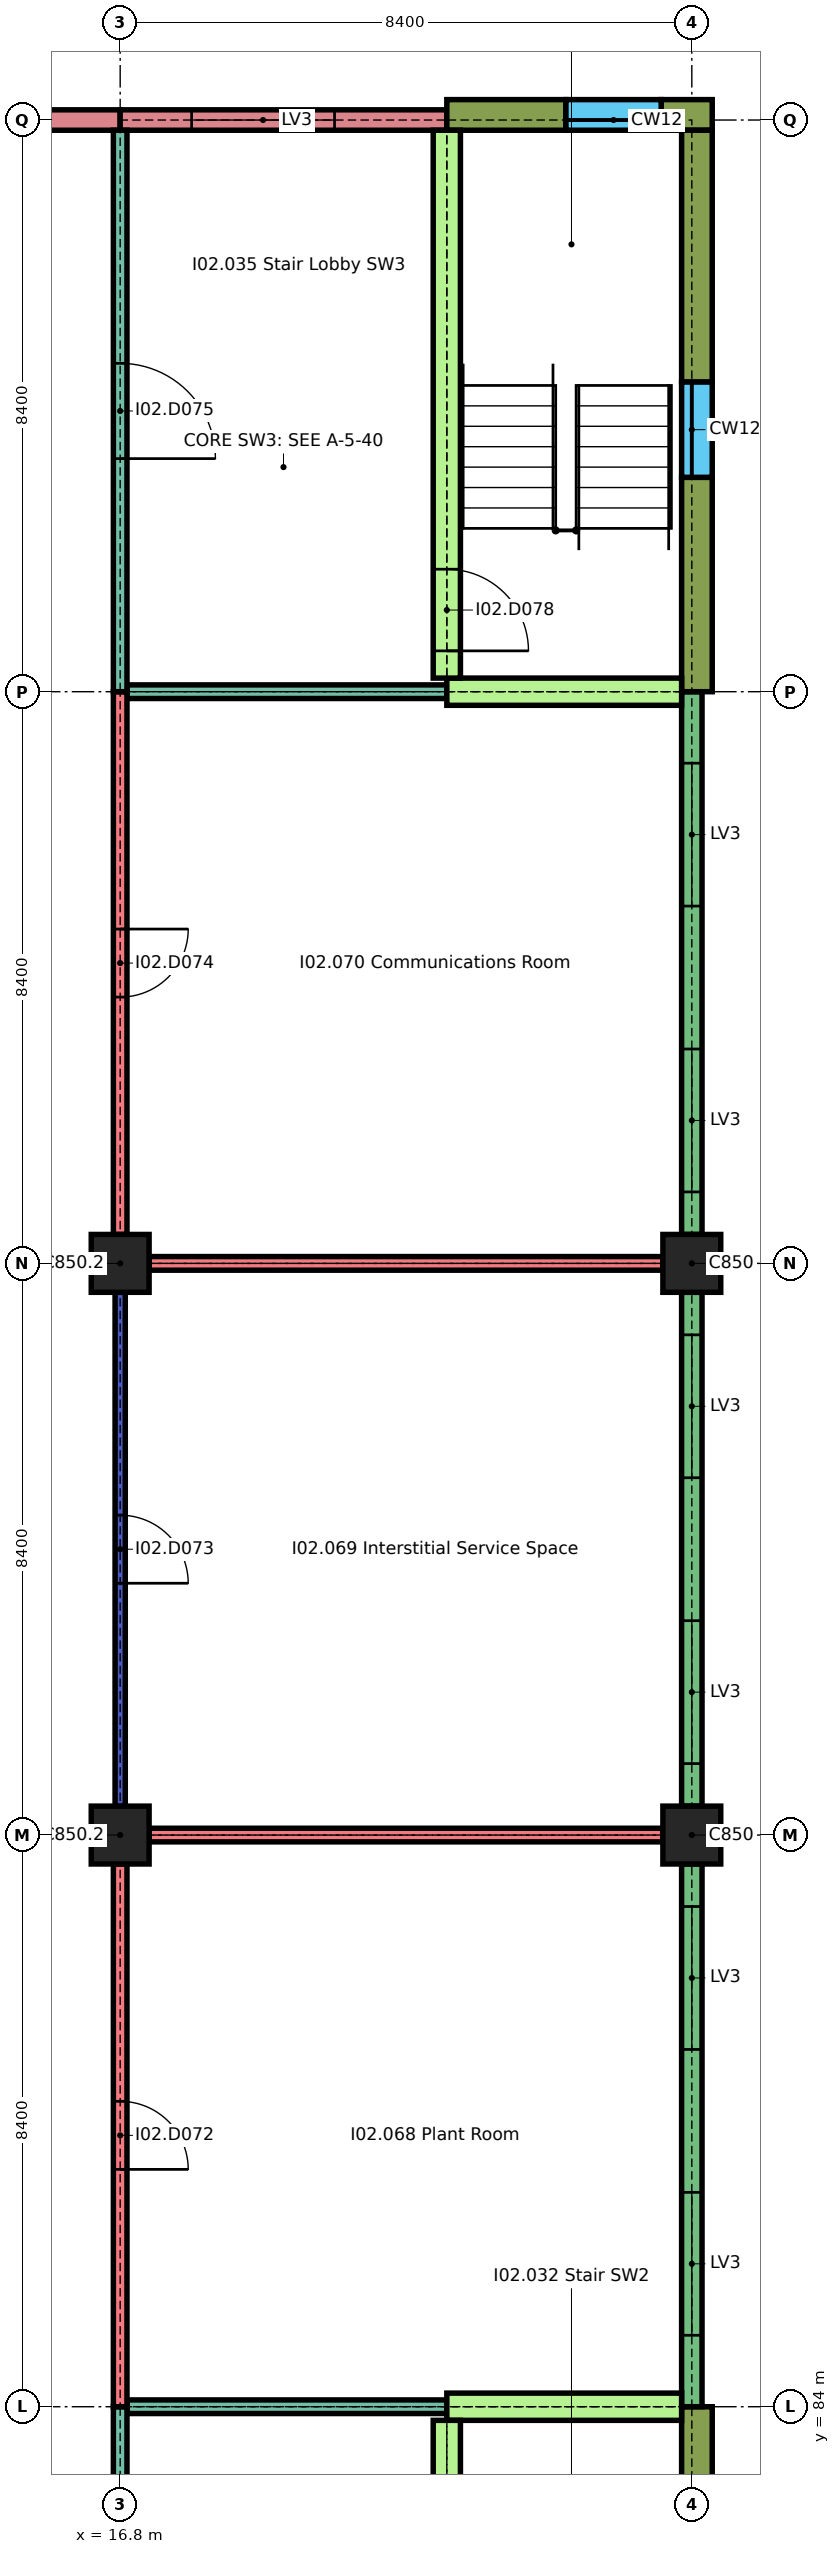
"""IFC4 building model, lengths in metres.
Left out: names, types, materials, properties, quantities, classifications, styles, units other than length and angle.
Written with IfcOpenShell. Run it as: python <this file> out.ifc"""

import sys

from ifc_helpers import new_model, si_unit, direction, frame, frame_2d, origin, origin_2d, place, context, subcontext, project, spatial, rectangle, extrude, element, fill, save


model = new_model("IFC4")
c1 = context("Model", 3, precision=1e-05, world=origin(), true_north=direction((0.0, 1.0)))
c2 = subcontext(c1, "Body", "Model", "MODEL_VIEW")
j1 = project(units=[si_unit("LENGTHUNIT", "METRE"), si_unit("PLANEANGLEUNIT", "RADIAN")], contexts=[c1])
p1 = place(None, origin())
s1 = spatial("IfcSite", under=j1, at=p1, CompositionType="ELEMENT")
p2 = place(p1, origin())
s2 = spatial("IfcBuilding", under=s1, at=p2, CompositionType="ELEMENT")
p3 = place(p2, frame((0.0, 0.0, 12.9)))
s3 = spatial("IfcBuildingStorey", under=s2, at=p3, CompositionType="ELEMENT", Elevation=12.9)
for number, where, z_axis, x_axis in (
    (1, (16.8, 92.4, 0.0), (0.0, 0.0, 1.0), (1.0, 0.0, 0.0)),
    (2, (25.2, 92.4, 0.0), (0.0, 0.0, 1.0), (1.0, 0.0, 0.0)),
    (3, (16.8, 100.8, 0.0), (0.0, 0.0, 1.0), (1.0, 0.0, 0.0)),
    (4, (25.2, 100.8, 0.0), (0.0, 0.0, 1.0), (1.0, 0.0, 0.0)),
):
    element("IfcColumn", number, at=place(p3, frame(where, z_axis=z_axis, x_axis=x_axis)), inside=s3, PredefinedType="COLUMN", context=c2, shape_type="SweptSolid", body=[
        extrude(rectangle(XDim=0.85, YDim=0.85, at=origin_2d()), origin(), (0.0, 0.0, 1.0), 2.04),
    ])
p4 = place(p3, frame((14.2, 117.6, 0.0), z_axis=(0.0, 0.0, 1.0), x_axis=(1.0, 0.0, 0.0)))
e5 = element("IfcWall", 5, at=p4, inside=s3, PredefinedType="SOLIDWALL", context=c2, shape_type="SweptSolid", body=[
    extrude(rectangle(XDim=2.6, YDim=0.3, at=frame_2d((1.3, 0.0))), origin(), (0.0, 0.0, 1.0), 2.04),
])
p5 = place(p3, frame((16.8, 117.6, 0.0), z_axis=(0.0, 0.0, 1.0), x_axis=(1.0, 0.0, 0.0)))
e6 = element("IfcWall", 6, at=p5, inside=s3, PredefinedType="SOLIDWALL", context=c2, shape_type="SweptSolid", body=[
    extrude(rectangle(XDim=4.8, YDim=0.3, at=frame_2d((2.4, 0.0))), origin(), (0.0, 0.0, 1.0), 2.04),
])
p6 = place(p5, frame((1.05, 0.0, 0.6)))
e7 = element("IfcOpeningElement", 7, at=p6, cuts=e6, PredefinedType="OPENING", context=c2, shape_type="SweptSolid", body=[
    extrude(rectangle(XDim=2.1, YDim=1.05, at=frame_2d((1.05, 0.525))), frame((0.0, 0.16, 0.0), z_axis=(0.0, -1.0, 0.0), x_axis=(1.0, 0.0, 0.0)), (0.0, 0.0, 1.0), 0.32),
])
p7 = place(p3, frame((21.6, 117.675, 0.0), z_axis=(0.0, 0.0, 1.0), x_axis=(1.0, 0.0, 0.0)))
e8 = element("IfcWall", 8, at=p7, inside=s3, PredefinedType="SOLIDWALL", context=c2, shape_type="SweptSolid", body=[
    extrude(rectangle(XDim=1.75, YDim=0.45, at=frame_2d((0.875, 0.0))), origin(), (0.0, 0.0, 1.0), 2.04),
])
p8 = place(p3, frame((24.75, 117.675, 0.0), z_axis=(0.0, 0.0, 1.0), x_axis=(1.0, 0.0, 0.0)))
e9 = element("IfcWall", 9, at=p8, inside=s3, PredefinedType="SOLIDWALL", context=c2, shape_type="SweptSolid", body=[
    extrude(rectangle(XDim=0.75, YDim=0.45, at=frame_2d((0.375, 0.0))), origin(), (0.0, 0.0, 1.0), 2.04),
])
p9 = place(p3, frame((23.35, 117.675, 0.0), z_axis=(0.0, 0.0, 1.0), x_axis=(1.0, 0.0, 0.0)))
e10 = element("IfcWall", 10, at=p9, inside=s3, PredefinedType="SOLIDWALL", context=c2, shape_type="SweptSolid", body=[
    extrude(rectangle(XDim=1.4, YDim=0.45, at=frame_2d((0.7, 0.0))), origin(), (0.0, 0.0, 1.0), 0.6),
])
p10 = place(p3, frame((25.275, 80.15, 0.0), z_axis=(0.0, 0.0, 1.0), x_axis=(0.0, 1.0, 0.0)))
e11 = element("IfcWall", 11, at=p10, inside=s3, PredefinedType="SOLIDWALL", context=c2, shape_type="SweptSolid", body=[
    extrude(rectangle(XDim=3.85, YDim=0.45, at=frame_2d((1.925, 0.0))), origin(), (0.0, 0.0, 1.0), 2.04),
])
p11 = place(p3, frame((25.2, 84.0, 0.0), z_axis=(0.0, 0.0, 1.0), x_axis=(0.0, 1.0, 0.0)))
e12 = element("IfcWall", 12, at=p11, inside=s3, PredefinedType="SOLIDWALL", context=c2, shape_type="SweptSolid", body=[
    extrude(rectangle(XDim=7.975, YDim=0.3, at=frame_2d((3.988, 0.0))), origin(), (0.0, 0.0, 1.0), 1.74),
])
p12 = place(p11, frame((1.05, 0.0, 0.6)))
e13 = element("IfcOpeningElement", 13, at=p12, cuts=e12, PredefinedType="OPENING", context=c2, shape_type="SweptSolid", body=[
    extrude(rectangle(XDim=2.1, YDim=1.05, at=frame_2d((1.05, 0.525))), frame((0.0, 0.16, 0.0), z_axis=(0.0, -1.0, 0.0), x_axis=(1.0, 0.0, 0.0)), (0.0, 0.0, 1.0), 0.32),
])
p13 = place(p11, frame((5.25, 0.0, 0.6)))
e14 = element("IfcOpeningElement", 14, at=p13, cuts=e12, PredefinedType="OPENING", context=c2, shape_type="SweptSolid", body=[
    extrude(rectangle(XDim=2.1, YDim=1.05, at=frame_2d((1.05, 0.525))), frame((0.0, 0.16, 0.0), z_axis=(0.0, -1.0, 0.0), x_axis=(1.0, 0.0, 0.0)), (0.0, 0.0, 1.0), 0.32),
])
p14 = place(p3, frame((25.2, 92.825, 0.0), z_axis=(0.0, 0.0, 1.0), x_axis=(0.0, 1.0, 0.0)))
e15 = element("IfcWall", 15, at=p14, inside=s3, PredefinedType="SOLIDWALL", context=c2, shape_type="SweptSolid", body=[
    extrude(rectangle(XDim=7.55, YDim=0.3, at=frame_2d((3.775, 0.0))), origin(), (0.0, 0.0, 1.0), 1.74),
])
p15 = place(p14, frame((0.625, 0.0, 0.6)))
e16 = element("IfcOpeningElement", 16, at=p15, cuts=e15, PredefinedType="OPENING", context=c2, shape_type="SweptSolid", body=[
    extrude(rectangle(XDim=2.1, YDim=1.05, at=frame_2d((1.05, 0.525))), frame((0.0, 0.16, 0.0), z_axis=(0.0, -1.0, 0.0), x_axis=(1.0, 0.0, 0.0)), (0.0, 0.0, 1.0), 0.32),
])
p16 = place(p14, frame((4.825, 0.0, 0.6)))
e17 = element("IfcOpeningElement", 17, at=p16, cuts=e15, PredefinedType="OPENING", context=c2, shape_type="SweptSolid", body=[
    extrude(rectangle(XDim=2.1, YDim=1.05, at=frame_2d((1.05, 0.525))), frame((0.0, 0.16, 0.0), z_axis=(0.0, -1.0, 0.0), x_axis=(1.0, 0.0, 0.0)), (0.0, 0.0, 1.0), 0.32),
])
p17 = place(p3, frame((25.2, 101.225, 0.0), z_axis=(0.0, 0.0, 1.0), x_axis=(0.0, 1.0, 0.0)))
e18 = element("IfcWall", 18, at=p17, inside=s3, PredefinedType="SOLIDWALL", context=c2, shape_type="SweptSolid", body=[
    extrude(rectangle(XDim=7.975, YDim=0.3, at=frame_2d((3.987, 0.0))), origin(), (0.0, 0.0, 1.0), 1.74),
])
p18 = place(p17, frame((0.625, 0.0, 0.6)))
e19 = element("IfcOpeningElement", 19, at=p18, cuts=e18, PredefinedType="OPENING", context=c2, shape_type="SweptSolid", body=[
    extrude(rectangle(XDim=2.1, YDim=1.05, at=frame_2d((1.05, 0.525))), frame((0.0, 0.16, 0.0), z_axis=(0.0, -1.0, 0.0), x_axis=(1.0, 0.0, 0.0)), (0.0, 0.0, 1.0), 0.32),
])
p19 = place(p17, frame((4.825, 0.0, 0.6)))
e20 = element("IfcOpeningElement", 20, at=p19, cuts=e18, PredefinedType="OPENING", context=c2, shape_type="SweptSolid", body=[
    extrude(rectangle(XDim=2.1, YDim=1.05, at=frame_2d((1.05, 0.525))), frame((0.0, 0.16, 0.0), z_axis=(0.0, -1.0, 0.0), x_axis=(1.0, 0.0, 0.0)), (0.0, 0.0, 1.0), 0.32),
])
p20 = place(p3, frame((25.275, 109.2, 0.0), z_axis=(0.0, 0.0, 1.0), x_axis=(0.0, 1.0, 0.0)))
e21 = element("IfcWall", 21, at=p20, inside=s3, PredefinedType="SOLIDWALL", context=c2, shape_type="SweptSolid", body=[
    extrude(rectangle(XDim=3.15, YDim=0.45, at=frame_2d((1.575, 0.0))), origin(), (0.0, 0.0, 1.0), 2.04),
])
p21 = place(p3, frame((25.275, 113.75, 0.0), z_axis=(0.0, 0.0, 1.0), x_axis=(0.0, 1.0, 0.0)))
e22 = element("IfcWall", 22, at=p21, inside=s3, PredefinedType="SOLIDWALL", context=c2, shape_type="SweptSolid", body=[
    extrude(rectangle(XDim=3.7, YDim=0.45, at=frame_2d((1.85, 0.0))), origin(), (0.0, 0.0, 1.0), 2.04),
])
p22 = place(p3, frame((25.275, 112.35, 0.0), z_axis=(0.0, 0.0, 1.0), x_axis=(0.0, 1.0, 0.0)))
e23 = element("IfcWall", 23, at=p22, inside=s3, PredefinedType="SOLIDWALL", context=c2, shape_type="SweptSolid", body=[
    extrude(rectangle(XDim=1.4, YDim=0.45, at=frame_2d((0.7, 0.0))), origin(), (0.0, 0.0, 1.0), 0.6),
])
p23 = place(p3, frame((16.9, 84.0, 0.0), z_axis=(0.0, 0.0, 1.0), x_axis=(1.0, 0.0, 0.0)))
e24 = element("IfcWall", 24, at=p23, inside=s3, PredefinedType="PARTITIONING", context=c2, shape_type="SweptSolid", body=[
    extrude(rectangle(XDim=4.7, YDim=0.2, at=frame_2d((2.35, 0.0))), origin(), (0.0, 0.0, 1.0), 2.04),
])
p24 = place(p3, frame((21.6, 84.0, 0.0), z_axis=(0.0, 0.0, 1.0), x_axis=(1.0, 0.0, 0.0)))
e25 = element("IfcWall", 25, at=p24, inside=s3, PredefinedType="SHEAR", context=c2, shape_type="SweptSolid", body=[
    extrude(rectangle(XDim=3.45, YDim=0.4, at=frame_2d((1.725, 0.0))), origin(), (0.0, 0.0, 1.0), 2.04),
])
for number, where, z_axis, x_axis in (
    (26, (17.225, 92.4, 0.0), (0.0, 0.0, 1.0), (1.0, 0.0, 0.0)),
    (27, (17.225, 100.8, 0.0), (0.0, 0.0, 1.0), (1.0, 0.0, 0.0)),
):
    element("IfcWall", number, at=place(p3, frame(where, z_axis=z_axis, x_axis=x_axis)), inside=s3, PredefinedType="SOLIDWALL", context=c2, shape_type="SweptSolid", body=[
        extrude(rectangle(XDim=7.55, YDim=0.2, at=frame_2d((3.775, 0.0))), origin(), (0.0, 0.0, 1.0), 2.04),
    ])
p25 = place(p3, frame((16.9, 109.2, 0.0), z_axis=(0.0, 0.0, 1.0), x_axis=(1.0, 0.0, 0.0)))
e28 = element("IfcWall", 28, at=p25, inside=s3, PredefinedType="PARTITIONING", context=c2, shape_type="SweptSolid", body=[
    extrude(rectangle(XDim=4.7, YDim=0.2, at=frame_2d((2.35, 0.0))), origin(), (0.0, 0.0, 1.0), 2.04),
])
p26 = place(p3, frame((21.6, 109.2, 0.0), z_axis=(0.0, 0.0, 1.0), x_axis=(1.0, 0.0, 0.0)))
e29 = element("IfcWall", 29, at=p26, inside=s3, PredefinedType="SHEAR", context=c2, shape_type="SweptSolid", body=[
    extrude(rectangle(XDim=3.45, YDim=0.4, at=frame_2d((1.725, 0.0))), origin(), (0.0, 0.0, 1.0), 2.04),
])
p27 = place(p3, frame((16.8, 75.6, 0.0), z_axis=(0.0, 0.0, 1.0), x_axis=(0.0, 1.0, 0.0)))
e30 = element("IfcWall", 30, at=p27, inside=s3, PredefinedType="PARTITIONING", context=c2, shape_type="SweptSolid", body=[
    extrude(rectangle(XDim=8.4, YDim=0.2, at=frame_2d((4.2, 0.0))), origin(), (0.0, 0.0, 1.0), 2.04),
])
p28 = place(p27, frame((3.5, 0.0, 0.0)))
e31 = element("IfcOpeningElement", 31, at=p28, cuts=e30, PredefinedType="OPENING", context=c2, shape_type="SweptSolid", body=[
    extrude(rectangle(XDim=1.4, YDim=2.0, at=frame_2d((0.7, 1.0))), frame((0.0, 0.11, 0.0), z_axis=(0.0, -1.0, 0.0), x_axis=(1.0, 0.0, 0.0)), (0.0, 0.0, 1.0), 0.22),
])
p29 = place(p3, frame((16.8, 84.0, 0.0), z_axis=(0.0, 0.0, 1.0), x_axis=(0.0, 1.0, 0.0)))
e32 = element("IfcWall", 32, at=p29, inside=s3, PredefinedType="SOLIDWALL", context=c2, shape_type="SweptSolid", body=[
    extrude(rectangle(XDim=7.975, YDim=0.2, at=frame_2d((3.988, 0.0))), origin(), (0.0, 0.0, 1.0), 2.04),
])
p30 = place(p29, frame((3.488, 0.0, 0.0)))
e33 = element("IfcOpeningElement", 33, at=p30, cuts=e32, PredefinedType="OPENING", context=c2, shape_type="SweptSolid", body=[
    extrude(rectangle(XDim=1.0, YDim=2.0, at=frame_2d((0.5, 1.0))), frame((0.0, 0.11, 0.0), z_axis=(0.0, -1.0, 0.0), x_axis=(1.0, 0.0, 0.0)), (0.0, 0.0, 1.0), 0.22),
])
p31 = place(p3, frame((16.8, 92.825, 0.0), z_axis=(0.0, 0.0, 1.0), x_axis=(0.0, 1.0, 0.0)))
e34 = element("IfcWall", 34, at=p31, inside=s3, PredefinedType="PARTITIONING", context=c2, shape_type="SweptSolid", body=[
    extrude(rectangle(XDim=7.55, YDim=0.15, at=frame_2d((3.775, 0.0))), origin(), (0.0, 0.0, 1.0), 2.04),
])
p32 = place(p31, frame((3.275, 0.0, 0.0)))
e35 = element("IfcOpeningElement", 35, at=p32, cuts=e34, PredefinedType="OPENING", context=c2, shape_type="SweptSolid", body=[
    extrude(rectangle(XDim=1.0, YDim=2.0, at=frame_2d((0.5, 1.0))), frame((0.0, 0.085, 0.0), z_axis=(0.0, -1.0, 0.0), x_axis=(1.0, 0.0, 0.0)), (0.0, 0.0, 1.0), 0.17),
])
p33 = place(p3, frame((16.8, 101.225, 0.0), z_axis=(0.0, 0.0, 1.0), x_axis=(0.0, 1.0, 0.0)))
e36 = element("IfcWall", 36, at=p33, inside=s3, PredefinedType="SOLIDWALL", context=c2, shape_type="SweptSolid", body=[
    extrude(rectangle(XDim=7.975, YDim=0.2, at=frame_2d((3.987, 0.0))), origin(), (0.0, 0.0, 1.0), 2.04),
])
p34 = place(p33, frame((3.488, 0.0, 0.0)))
e37 = element("IfcOpeningElement", 37, at=p34, cuts=e36, PredefinedType="OPENING", context=c2, shape_type="SweptSolid", body=[
    extrude(rectangle(XDim=1.0, YDim=2.0, at=frame_2d((0.5, 1.0))), frame((0.0, 0.11, 0.0), z_axis=(0.0, -1.0, 0.0), x_axis=(1.0, 0.0, 0.0)), (0.0, 0.0, 1.0), 0.22),
])
p35 = place(p3, frame((16.8, 109.2, 0.0), z_axis=(0.0, 0.0, 1.0), x_axis=(0.0, 1.0, 0.0)))
e38 = element("IfcWall", 38, at=p35, inside=s3, PredefinedType="PARTITIONING", context=c2, shape_type="SweptSolid", body=[
    extrude(rectangle(XDim=8.25, YDim=0.2, at=frame_2d((4.125, 0.0))), origin(), (0.0, 0.0, 1.0), 2.04),
])
p36 = place(p35, frame((3.425, 0.0, 0.0)))
e39 = element("IfcOpeningElement", 39, at=p36, cuts=e38, PredefinedType="OPENING", context=c2, shape_type="SweptSolid", body=[
    extrude(rectangle(XDim=1.4, YDim=2.0, at=frame_2d((0.7, 1.0))), frame((0.0, 0.11, 0.0), z_axis=(0.0, -1.0, 0.0), x_axis=(1.0, 0.0, 0.0)), (0.0, 0.0, 1.0), 0.22),
])
p37 = place(p3, frame((21.6, 75.8, 0.0), z_axis=(0.0, 0.0, 1.0), x_axis=(0.0, 1.0, 0.0)))
e40 = element("IfcWall", 40, at=p37, inside=s3, PredefinedType="SHEAR", context=c2, shape_type="SweptSolid", body=[
    extrude(rectangle(XDim=8.0, YDim=0.4, at=frame_2d((4.0, 0.0))), origin(), (0.0, 0.0, 1.0), 2.04),
])
p38 = place(p37, frame((0.4, 0.0, 0.0)))
e41 = element("IfcOpeningElement", 41, at=p38, cuts=e40, PredefinedType="OPENING", context=c2, shape_type="SweptSolid", body=[
    extrude(rectangle(XDim=1.2, YDim=2.0, at=frame_2d((0.6, 1.0))), frame((0.0, 0.21, 0.0), z_axis=(0.0, -1.0, 0.0), x_axis=(1.0, 0.0, 0.0)), (0.0, 0.0, 1.0), 0.42),
])
p39 = place(p3, frame((21.6, 109.4, 0.0), z_axis=(0.0, 0.0, 1.0), x_axis=(0.0, 1.0, 0.0)))
e42 = element("IfcWall", 42, at=p39, inside=s3, PredefinedType="SHEAR", context=c2, shape_type="SweptSolid", body=[
    extrude(rectangle(XDim=8.05, YDim=0.4, at=frame_2d((4.025, 0.0))), origin(), (0.0, 0.0, 1.0), 2.04),
])
p40 = place(p39, frame((0.4, 0.0, 0.0)))
e43 = element("IfcOpeningElement", 43, at=p40, cuts=e42, PredefinedType="OPENING", context=c2, shape_type="SweptSolid", body=[
    extrude(rectangle(XDim=1.2, YDim=2.0, at=frame_2d((0.6, 1.0))), frame((0.0, 0.21, 0.0), z_axis=(0.0, -1.0, 0.0), x_axis=(1.0, 0.0, 0.0)), (0.0, 0.0, 1.0), 0.42),
])
p41 = place(p6, origin())
e44 = element("IfcWindow", 44, at=p41, inside=s3, PartitioningType="SINGLE_PANEL", PredefinedType="WINDOW", context=c2, shape_type="SweptSolid", body=[
    extrude(rectangle(XDim=2.1, YDim=1.05, at=frame_2d((1.05, 0.525))), frame((0.0, 0.075, 0.0), z_axis=(0.0, -1.0, 0.0), x_axis=(1.0, 0.0, 0.0)), (0.0, 0.0, 1.0), 0.15),
])
fill(e7, e44)
p42 = place(p12, origin())
e45 = element("IfcWindow", 45, at=p42, inside=s3, PartitioningType="SINGLE_PANEL", PredefinedType="WINDOW", context=c2, shape_type="SweptSolid", body=[
    extrude(rectangle(XDim=2.1, YDim=1.05, at=frame_2d((1.05, 0.525))), frame((0.0, 0.075, 0.0), z_axis=(0.0, -1.0, 0.0), x_axis=(1.0, 0.0, 0.0)), (0.0, 0.0, 1.0), 0.15),
])
fill(e13, e45)
p43 = place(p13, origin())
e46 = element("IfcWindow", 46, at=p43, inside=s3, PartitioningType="SINGLE_PANEL", PredefinedType="WINDOW", context=c2, shape_type="SweptSolid", body=[
    extrude(rectangle(XDim=2.1, YDim=1.05, at=frame_2d((1.05, 0.525))), frame((0.0, 0.075, 0.0), z_axis=(0.0, -1.0, 0.0), x_axis=(1.0, 0.0, 0.0)), (0.0, 0.0, 1.0), 0.15),
])
fill(e14, e46)
p44 = place(p15, origin())
e47 = element("IfcWindow", 47, at=p44, inside=s3, PartitioningType="SINGLE_PANEL", PredefinedType="WINDOW", context=c2, shape_type="SweptSolid", body=[
    extrude(rectangle(XDim=2.1, YDim=1.05, at=frame_2d((1.05, 0.525))), frame((0.0, 0.075, 0.0), z_axis=(0.0, -1.0, 0.0), x_axis=(1.0, 0.0, 0.0)), (0.0, 0.0, 1.0), 0.15),
])
fill(e16, e47)
p45 = place(p16, origin())
e48 = element("IfcWindow", 48, at=p45, inside=s3, PartitioningType="SINGLE_PANEL", PredefinedType="WINDOW", context=c2, shape_type="SweptSolid", body=[
    extrude(rectangle(XDim=2.1, YDim=1.05, at=frame_2d((1.05, 0.525))), frame((0.0, 0.075, 0.0), z_axis=(0.0, -1.0, 0.0), x_axis=(1.0, 0.0, 0.0)), (0.0, 0.0, 1.0), 0.15),
])
fill(e17, e48)
p46 = place(p18, origin())
e49 = element("IfcWindow", 49, at=p46, inside=s3, PartitioningType="SINGLE_PANEL", PredefinedType="WINDOW", context=c2, shape_type="SweptSolid", body=[
    extrude(rectangle(XDim=2.1, YDim=1.05, at=frame_2d((1.05, 0.525))), frame((0.0, 0.075, 0.0), z_axis=(0.0, -1.0, 0.0), x_axis=(1.0, 0.0, 0.0)), (0.0, 0.0, 1.0), 0.15),
])
fill(e19, e49)
p47 = place(p19, origin())
e50 = element("IfcWindow", 50, at=p47, inside=s3, PartitioningType="SINGLE_PANEL", PredefinedType="WINDOW", context=c2, shape_type="SweptSolid", body=[
    extrude(rectangle(XDim=2.1, YDim=1.05, at=frame_2d((1.05, 0.525))), frame((0.0, 0.075, 0.0), z_axis=(0.0, -1.0, 0.0), x_axis=(1.0, 0.0, 0.0)), (0.0, 0.0, 1.0), 0.15),
])
fill(e20, e50)
p48 = place(p30, origin())
e51 = element("IfcDoor", 51, at=p48, inside=s3, OperationType="SINGLE_SWING_LEFT", PredefinedType="DOOR", context=c2, shape_type="SweptSolid", body=[
    extrude(rectangle(XDim=1.0, YDim=2.0, at=frame_2d((0.5, 1.0))), frame((0.0, 0.025, 0.0), z_axis=(0.0, -1.0, 0.0), x_axis=(1.0, 0.0, 0.0)), (0.0, 0.0, 1.0), 0.05),
])
fill(e33, e51)
p49 = place(p32, origin())
e52 = element("IfcDoor", 52, at=p49, inside=s3, OperationType="SINGLE_SWING_LEFT", PredefinedType="DOOR", context=c2, shape_type="SweptSolid", body=[
    extrude(rectangle(XDim=1.0, YDim=2.0, at=frame_2d((0.5, 1.0))), frame((0.0, 0.025, 0.0), z_axis=(0.0, -1.0, 0.0), x_axis=(1.0, 0.0, 0.0)), (0.0, 0.0, 1.0), 0.05),
])
fill(e35, e52)
p50 = place(p34, origin())
e53 = element("IfcDoor", 53, at=p50, inside=s3, OperationType="SINGLE_SWING_RIGHT", PredefinedType="DOOR", context=c2, shape_type="SweptSolid", body=[
    extrude(rectangle(XDim=1.0, YDim=2.0, at=frame_2d((0.5, 1.0))), frame((0.0, 0.025, 0.0), z_axis=(0.0, -1.0, 0.0), x_axis=(1.0, 0.0, 0.0)), (0.0, 0.0, 1.0), 0.05),
])
fill(e37, e53)
p51 = place(p36, origin())
e54 = element("IfcDoor", 54, at=p51, inside=s3, OperationType="SINGLE_SWING_LEFT", PredefinedType="DOOR", context=c2, shape_type="SweptSolid", body=[
    extrude(rectangle(XDim=1.4, YDim=2.0, at=frame_2d((0.7, 1.0))), frame((0.0, 0.03, 0.0), z_axis=(0.0, -1.0, 0.0), x_axis=(1.0, 0.0, 0.0)), (0.0, 0.0, 1.0), 0.06),
])
fill(e39, e54)
p52 = place(p40, origin())
e55 = element("IfcDoor", 55, at=p52, inside=s3, OperationType="SINGLE_SWING_LEFT", PredefinedType="DOOR", context=c2, shape_type="SweptSolid", body=[
    extrude(rectangle(XDim=1.2, YDim=2.0, at=frame_2d((0.6, 1.0))), frame((0.0, 0.025, 0.0), z_axis=(0.0, -1.0, 0.0), x_axis=(1.0, 0.0, 0.0)), (0.0, 0.0, 1.0), 0.05),
])
fill(e43, e55)
save(model, sys.argv[1])
